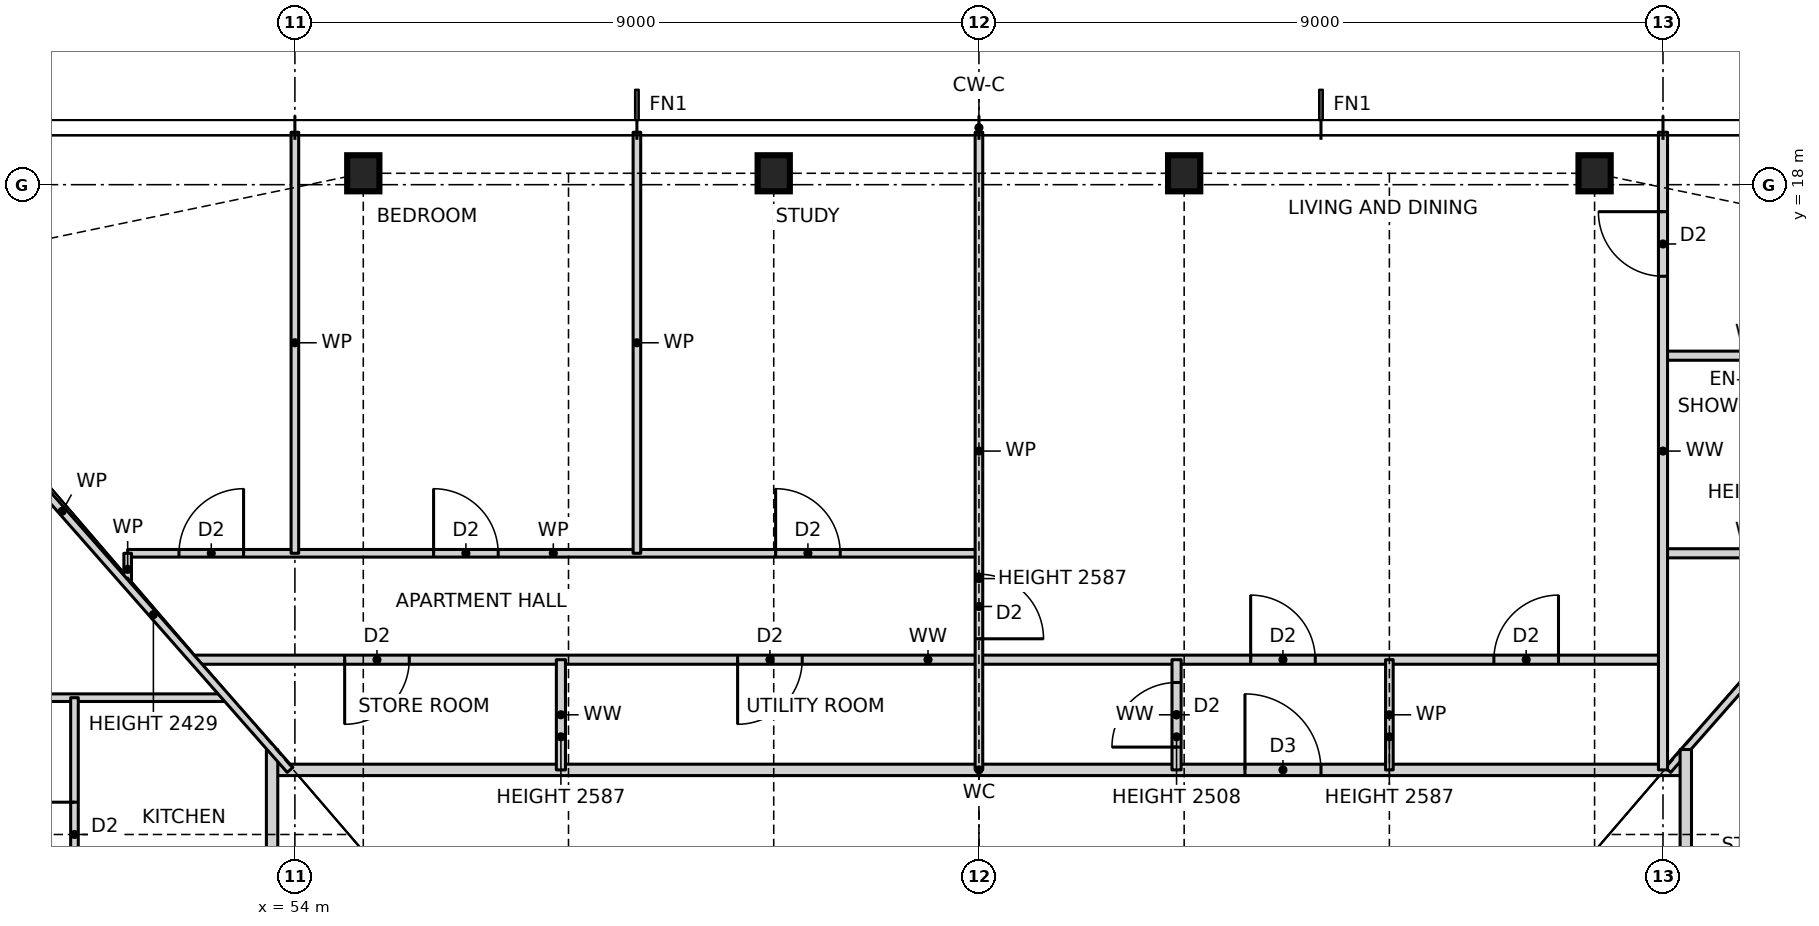
"""IFC4 building model, lengths in metres.
Left out: names, types, materials, properties, quantities, classifications, styles, units other than length and angle.
Written with IfcOpenShell. Run it as: python <this file> out.ifc"""

import sys

from ifc_helpers import new_model, si_unit, direction, frame, frame_2d, origin, origin_2d, place, context, subcontext, project, spatial, rectangle, i_section, extrude, element, fill, save


model = new_model("IFC4")
c1 = context("Model", 3, precision=1e-05, world=origin(), true_north=direction((0.0, 1.0)))
c2 = subcontext(c1, "Body", "Model", "MODEL_VIEW")
j1 = project(units=[si_unit("LENGTHUNIT", "METRE"), si_unit("PLANEANGLEUNIT", "RADIAN")], contexts=[c1])
p1 = place(None, origin())
s1 = spatial("IfcSite", under=j1, at=p1, CompositionType="ELEMENT")
p2 = place(p1, origin())
s2 = spatial("IfcBuilding", under=s1, at=p2, CompositionType="ELEMENT")
p3 = place(p2, frame((0.0, 0.0, 53.5)))
s3 = spatial("IfcBuildingStorey", under=s2, at=p3, CompositionType="ELEMENT", Elevation=53.5)
for number, where, z_axis, x_axis in (
    (1, (71.1, 18.15, 0.0), (0.0, 0.0, 1.0), (1.0, 0.0, 0.0)),
    (2, (65.7, 18.15, 0.0), (0.0, 0.0, 1.0), (1.0, 0.0, 0.0)),
    (3, (60.3, 18.15, 0.0), (0.0, 0.0, 1.0), (1.0, 0.0, 0.0)),
    (4, (54.9, 18.15, 0.0), (0.0, 0.0, 1.0), (1.0, 0.0, 0.0)),
):
    element("IfcColumn", number, at=place(p3, frame(where, z_axis=z_axis, x_axis=x_axis)), inside=s3, PredefinedType="COLUMN", context=c2, shape_type="SweptSolid", body=[
        extrude(i_section(OverallWidth=0.424, OverallDepth=0.475, WebThickness=0.048, FlangeThickness=0.077, at=origin_2d()), origin(), (0.0, 0.0, 1.0), 3.5),
    ])
p4 = place(p3, frame((53.7, 10.3, 0.0), z_axis=(0.0, 0.0, 1.0), x_axis=(1.0, 0.0, 0.0)))
e5 = element("IfcWall", 5, at=p4, inside=s3, PredefinedType="PARTITIONING", context=c2, shape_type="SweptSolid", body=[
    extrude(rectangle(XDim=18.6, YDim=0.15, at=frame_2d((9.3, 0.0))), origin(), (0.0, 0.0, 1.0), 3.27),
])
p5 = place(p4, frame((12.8, 0.0, 0.0)))
e6 = element("IfcOpeningElement", 6, at=p5, cuts=e5, PredefinedType="OPENING", context=c2, shape_type="SweptSolid", body=[
    extrude(rectangle(XDim=1.0, YDim=2.1, at=frame_2d((0.5, 1.05))), frame((0.0, 0.085, 0.0), z_axis=(0.0, -1.0, 0.0), x_axis=(1.0, 0.0, 0.0)), (0.0, 0.0, 1.0), 0.17),
])
p6 = place(p3, frame((46.56, 11.25, 0.0), z_axis=(0.0, 0.0, 1.0), x_axis=(1.0, 0.0, 0.0)))
e7 = element("IfcWall", 7, at=p6, inside=s3, PredefinedType="PARTITIONING", context=c2, shape_type="SweptSolid", body=[
    extrude(rectangle(XDim=6.54, YDim=0.1, at=frame_2d((3.27, 0.0))), origin(), (0.0, 0.0, 1.0), 3.27),
])
p7 = place(p6, frame((1.845, 0.0, 0.0)))
e8 = element("IfcOpeningElement", 8, at=p7, cuts=e7, PredefinedType="OPENING", context=c2, shape_type="SweptSolid", body=[
    extrude(rectangle(XDim=0.85, YDim=2.1, at=frame_2d((0.425, 1.05))), frame((0.0, 0.06, 0.0), z_axis=(0.0, -1.0, 0.0), x_axis=(1.0, 0.0, 0.0)), (0.0, 0.0, 1.0), 0.12),
])
p8 = place(p3, frame((52.66, 11.75, 0.0), z_axis=(0.0, 0.0, 1.0), x_axis=(1.0, 0.0, 0.0)))
e9 = element("IfcWall", 9, at=p8, inside=s3, PredefinedType="PARTITIONING", context=c2, shape_type="SweptSolid", body=[
    extrude(rectangle(XDim=19.34, YDim=0.12, at=frame_2d((9.67, 0.0))), origin(), (0.0, 0.0, 1.0), 3.27),
])
p9 = place(p8, frame((17.115, 0.0, 0.0)))
e10 = element("IfcOpeningElement", 10, at=p9, cuts=e9, PredefinedType="OPENING", context=c2, shape_type="SweptSolid", body=[
    extrude(rectangle(XDim=0.85, YDim=2.1, at=frame_2d((0.425, 1.05))), frame((0.0, 0.07, 0.0), z_axis=(0.0, -1.0, 0.0), x_axis=(1.0, 0.0, 0.0)), (0.0, 0.0, 1.0), 0.14),
])
p10 = place(p8, frame((13.915, 0.0, 0.0)))
e11 = element("IfcOpeningElement", 11, at=p10, cuts=e9, PredefinedType="OPENING", context=c2, shape_type="SweptSolid", body=[
    extrude(rectangle(XDim=0.85, YDim=2.1, at=frame_2d((0.425, 1.05))), frame((0.0, 0.07, 0.0), z_axis=(0.0, -1.0, 0.0), x_axis=(1.0, 0.0, 0.0)), (0.0, 0.0, 1.0), 0.14),
])
p11 = place(p8, frame((7.165, 0.0, 0.0)))
e12 = element("IfcOpeningElement", 12, at=p11, cuts=e9, PredefinedType="OPENING", context=c2, shape_type="SweptSolid", body=[
    extrude(rectangle(XDim=0.85, YDim=2.1, at=frame_2d((0.425, 1.05))), frame((0.0, 0.07, 0.0), z_axis=(0.0, -1.0, 0.0), x_axis=(1.0, 0.0, 0.0)), (0.0, 0.0, 1.0), 0.14),
])
p12 = place(p8, frame((1.995, 0.0, 0.0)))
e13 = element("IfcOpeningElement", 13, at=p12, cuts=e9, PredefinedType="OPENING", context=c2, shape_type="SweptSolid", body=[
    extrude(rectangle(XDim=0.85, YDim=2.1, at=frame_2d((0.425, 1.05))), frame((0.0, 0.07, 0.0), z_axis=(0.0, -1.0, 0.0), x_axis=(1.0, 0.0, 0.0)), (0.0, 0.0, 1.0), 0.14),
])
p13 = place(p3, frame((51.8, 13.15, 0.0), z_axis=(0.0, 0.0, 1.0), x_axis=(1.0, 0.0, 0.0)))
e14 = element("IfcWall", 14, at=p13, inside=s3, PredefinedType="PARTITIONING", context=c2, shape_type="SweptSolid", body=[
    extrude(rectangle(XDim=11.2, YDim=0.1, at=frame_2d((5.6, 0.0))), origin(), (0.0, 0.0, 1.0), 3.27),
])
p14 = place(p13, frame((8.525, 0.0, 0.0)))
e15 = element("IfcOpeningElement", 15, at=p14, cuts=e14, PredefinedType="OPENING", context=c2, shape_type="SweptSolid", body=[
    extrude(rectangle(XDim=0.85, YDim=2.1, at=frame_2d((0.425, 1.05))), frame((0.0, 0.06, 0.0), z_axis=(0.0, -1.0, 0.0), x_axis=(1.0, 0.0, 0.0)), (0.0, 0.0, 1.0), 0.12),
])
p15 = place(p13, frame((4.025, 0.0, 0.0)))
e16 = element("IfcOpeningElement", 16, at=p15, cuts=e14, PredefinedType="OPENING", context=c2, shape_type="SweptSolid", body=[
    extrude(rectangle(XDim=0.85, YDim=2.1, at=frame_2d((0.425, 1.05))), frame((0.0, 0.06, 0.0), z_axis=(0.0, -1.0, 0.0), x_axis=(1.0, 0.0, 0.0)), (0.0, 0.0, 1.0), 0.12),
])
p16 = place(p13, frame((0.675, 0.0, 0.0)))
e17 = element("IfcOpeningElement", 17, at=p16, cuts=e14, PredefinedType="OPENING", context=c2, shape_type="SweptSolid", body=[
    extrude(rectangle(XDim=0.85, YDim=2.1, at=frame_2d((0.425, 1.05))), frame((0.0, 0.06, 0.0), z_axis=(0.0, -1.0, 0.0), x_axis=(1.0, 0.0, 0.0)), (0.0, 0.0, 1.0), 0.12),
])
for number, where, z_axis, x_axis in (
    (18, (72.0, 13.15, 0.0), (0.0, 0.0, 1.0), (1.0, 0.0, 0.0)),
    (19, (72.0, 15.75, 0.0), (0.0, 0.0, 1.0), (1.0, 0.0, 0.0)),
):
    element("IfcWall", number, at=place(p3, frame(where, z_axis=z_axis, x_axis=x_axis)), inside=s3, PredefinedType="PARTITIONING", context=c2, shape_type="SweptSolid", body=[
        extrude(rectangle(XDim=2.4, YDim=0.12, at=frame_2d((1.2, 0.0))), origin(), (0.0, 0.0, 1.0), 3.27),
    ])
p17 = place(p3, frame((72.064, 10.3, 0.0), z_axis=(0.0, 0.0, 1.0), x_axis=(0.660700699661, 0.750649442461, 0.0)))
e20 = element("IfcWall", 20, at=p17, inside=s3, PredefinedType="PARTITIONING", context=c2, shape_type="SweptSolid", body=[
    extrude(rectangle(XDim=9.071, YDim=0.1, at=frame_2d((4.535, 0.0))), origin(), (0.0, 0.0, 1.0), 2.429),
])
p18 = place(p3, frame((72.3, -10.568, 0.0), z_axis=(0.0, 0.0, 1.0), x_axis=(0.0, 1.0, 0.0)))
e21 = element("IfcWall", 21, at=p18, inside=s3, PredefinedType="PARTITIONING", context=c2, shape_type="SweptSolid", body=[
    extrude(rectangle(XDim=21.136, YDim=0.15, at=frame_2d((10.568, 0.0))), origin(), (0.0, 0.0, 1.0), 3.27),
])
p19 = place(p18, frame((8.318, 0.0, 0.0)))
e22 = element("IfcOpeningElement", 22, at=p19, cuts=e21, PredefinedType="OPENING", context=c2, shape_type="SweptSolid", body=[
    extrude(rectangle(XDim=1.0, YDim=2.1, at=frame_2d((0.5, 1.05))), frame((0.0, 0.085, 0.0), z_axis=(0.0, -1.0, 0.0), x_axis=(1.0, 0.0, 0.0)), (0.0, 0.0, 1.0), 0.17),
])
p20 = place(p3, frame((72.0, 10.3, 0.0), z_axis=(0.0, 0.0, 1.0), x_axis=(0.0, 1.0, 0.0)))
e23 = element("IfcWall", 23, at=p20, inside=s3, PredefinedType="PARTITIONING", context=c2, shape_type="SweptSolid", body=[
    extrude(rectangle(XDim=8.39, YDim=0.12, at=frame_2d((4.195, 0.0))), origin(), (0.0, 0.0, 1.0), 3.27),
])
p21 = place(p20, frame((6.495, 0.0, 0.0)))
e24 = element("IfcOpeningElement", 24, at=p21, cuts=e23, PredefinedType="OPENING", context=c2, shape_type="SweptSolid", body=[
    extrude(rectangle(XDim=0.85, YDim=2.1, at=frame_2d((0.425, 1.05))), frame((0.0, 0.07, 0.0), z_axis=(0.0, -1.0, 0.0), x_axis=(1.0, 0.0, 0.0)), (0.0, 0.0, 1.0), 0.14),
])
p22 = place(p3, frame((68.4, 10.3, 0.0), z_axis=(0.0, 0.0, 1.0), x_axis=(0.0, 1.0, 0.0)))
e25 = element("IfcWall", 25, at=p22, inside=s3, PredefinedType="PARTITIONING", context=c2, shape_type="SweptSolid", body=[
    extrude(rectangle(XDim=1.45, YDim=0.1, at=frame_2d((0.725, 0.0))), origin(), (0.0, 0.0, 1.0), 2.587),
])
p23 = place(p3, frame((65.6, 10.3, 0.0), z_axis=(0.0, 0.0, 1.0), x_axis=(0.0, 1.0, 0.0)))
e26 = element("IfcWall", 26, at=p23, inside=s3, PredefinedType="PARTITIONING", context=c2, shape_type="SweptSolid", body=[
    extrude(rectangle(XDim=1.45, YDim=0.12, at=frame_2d((0.725, 0.0))), origin(), (0.0, 0.0, 1.0), 2.508),
])
p24 = place(p23, frame((0.3, 0.0, 0.0)))
e27 = element("IfcOpeningElement", 27, at=p24, cuts=e26, PredefinedType="OPENING", context=c2, shape_type="SweptSolid", body=[
    extrude(rectangle(XDim=0.85, YDim=2.1, at=frame_2d((0.425, 1.05))), frame((0.0, 0.07, 0.0), z_axis=(0.0, -1.0, 0.0), x_axis=(1.0, 0.0, 0.0)), (0.0, 0.0, 1.0), 0.14),
])
p25 = place(p3, frame((63.0, 10.3, 0.0), z_axis=(0.0, 0.0, 1.0), x_axis=(0.0, 1.0, 0.0)))
e28 = element("IfcWall", 28, at=p25, inside=s3, PredefinedType="PARTITIONING", context=c2, shape_type="SweptSolid", body=[
    extrude(rectangle(XDim=8.39, YDim=0.1, at=frame_2d((4.195, 0.0))), origin(), (0.0, 0.0, 1.0), 2.587),
])
p26 = place(p25, frame((1.725, 0.0, 0.0)))
e29 = element("IfcOpeningElement", 29, at=p26, cuts=e28, PredefinedType="OPENING", context=c2, shape_type="SweptSolid", body=[
    extrude(rectangle(XDim=0.85, YDim=2.1, at=frame_2d((0.425, 1.05))), frame((0.0, 0.06, 0.0), z_axis=(0.0, -1.0, 0.0), x_axis=(1.0, 0.0, 0.0)), (0.0, 0.0, 1.0), 0.12),
])
p27 = place(p3, frame((58.5, 13.15, 0.0), z_axis=(0.0, 0.0, 1.0), x_axis=(0.0, 1.0, 0.0)))
e30 = element("IfcWall", 30, at=p27, inside=s3, PredefinedType="PARTITIONING", context=c2, shape_type="SweptSolid", body=[
    extrude(rectangle(XDim=5.54, YDim=0.1, at=frame_2d((2.77, 0.0))), origin(), (0.0, 0.0, 1.0), 3.27),
])
p28 = place(p3, frame((57.5, 10.3, 0.0), z_axis=(0.0, 0.0, 1.0), x_axis=(0.0, 1.0, 0.0)))
e31 = element("IfcWall", 31, at=p28, inside=s3, PredefinedType="PARTITIONING", context=c2, shape_type="SweptSolid", body=[
    extrude(rectangle(XDim=1.45, YDim=0.12, at=frame_2d((0.725, 0.0))), origin(), (0.0, 0.0, 1.0), 2.587),
])
p29 = place(p3, frame((54.0, 13.15, 0.0), z_axis=(0.0, 0.0, 1.0), x_axis=(0.0, 1.0, 0.0)))
e32 = element("IfcWall", 32, at=p29, inside=s3, PredefinedType="PARTITIONING", context=c2, shape_type="SweptSolid", body=[
    extrude(rectangle(XDim=5.54, YDim=0.1, at=frame_2d((2.77, 0.0))), origin(), (0.0, 0.0, 1.0), 3.27),
])
p30 = place(p3, frame((53.7, -10.568, 0.0), z_axis=(0.0, 0.0, 1.0), x_axis=(0.0, 1.0, 0.0)))
e33 = element("IfcWall", 33, at=p30, inside=s3, PredefinedType="PARTITIONING", context=c2, shape_type="SweptSolid", body=[
    extrude(rectangle(XDim=21.136, YDim=0.15, at=frame_2d((10.568, 0.0))), origin(), (0.0, 0.0, 1.0), 3.27),
])
p31 = place(p30, frame((16.318, 0.0, 0.0)))
e34 = element("IfcOpeningElement", 34, at=p31, cuts=e33, PredefinedType="OPENING", context=c2, shape_type="SweptSolid", body=[
    extrude(rectangle(XDim=1.0, YDim=2.1, at=frame_2d((0.5, 1.05))), frame((0.0, 0.085, 0.0), z_axis=(0.0, -1.0, 0.0), x_axis=(1.0, 0.0, 0.0)), (0.0, 0.0, 1.0), 0.17),
])
p32 = place(p30, frame((10.918, 0.0, 0.0)))
e35 = element("IfcOpeningElement", 35, at=p32, cuts=e33, PredefinedType="OPENING", context=c2, shape_type="SweptSolid", body=[
    extrude(rectangle(XDim=1.0, YDim=2.1, at=frame_2d((0.5, 1.05))), frame((0.0, 0.085, 0.0), z_axis=(0.0, -1.0, 0.0), x_axis=(1.0, 0.0, 0.0)), (0.0, 0.0, 1.0), 0.17),
])
p33 = place(p3, frame((51.8, 12.727, 0.0), z_axis=(0.0, 0.0, 1.0), x_axis=(0.0, 1.0, 0.0)))
e36 = element("IfcWall", 36, at=p33, inside=s3, PredefinedType="PARTITIONING", context=c2, shape_type="SweptSolid", body=[
    extrude(rectangle(XDim=0.423, YDim=0.1, at=frame_2d((0.211, 0.0))), origin(), (0.0, 0.0, 1.0), 3.27),
])
p34 = place(p3, frame((51.1, 2.25, 0.0), z_axis=(0.0, 0.0, 1.0), x_axis=(0.0, 1.0, 0.0)))
e37 = element("IfcWall", 37, at=p34, inside=s3, PredefinedType="PARTITIONING", context=c2, shape_type="SweptSolid", body=[
    extrude(rectangle(XDim=9.0, YDim=0.1, at=frame_2d((4.5, 0.0))), origin(), (0.0, 0.0, 1.0), 3.27),
])
p35 = place(p34, frame((6.775, 0.0, 0.0)))
e38 = element("IfcOpeningElement", 38, at=p35, cuts=e37, PredefinedType="OPENING", context=c2, shape_type="SweptSolid", body=[
    extrude(rectangle(XDim=0.85, YDim=2.1, at=frame_2d((0.425, 1.05))), frame((0.0, 0.06, 0.0), z_axis=(0.0, -1.0, 0.0), x_axis=(1.0, 0.0, 0.0)), (0.0, 0.0, 1.0), 0.12),
])
p36 = place(p34, frame((3.575, 0.0, 0.0)))
e39 = element("IfcOpeningElement", 39, at=p36, cuts=e37, PredefinedType="OPENING", context=c2, shape_type="SweptSolid", body=[
    extrude(rectangle(XDim=0.85, YDim=2.1, at=frame_2d((0.425, 1.05))), frame((0.0, 0.06, 0.0), z_axis=(0.0, -1.0, 0.0), x_axis=(1.0, 0.0, 0.0)), (0.0, 0.0, 1.0), 0.12),
])
p37 = place(p3, frame((53.936, 10.3, 0.0), z_axis=(0.0, 0.0, 1.0), x_axis=(-0.660638210404, 0.750704439146, 0.0)))
e40 = element("IfcWall", 40, at=p37, inside=s3, PredefinedType="PARTITIONING", context=c2, shape_type="SweptSolid", body=[
    extrude(rectangle(XDim=9.07, YDim=0.1, at=frame_2d((4.535, 0.0))), origin(), (0.0, 0.0, 1.0), 2.429),
])
p38 = place(p9, origin())
e41 = element("IfcDoor", 41, at=p38, inside=s3, OperationType="SINGLE_SWING_RIGHT", PredefinedType="DOOR", context=c2, shape_type="SweptSolid", body=[
    extrude(rectangle(XDim=0.85, YDim=2.1, at=frame_2d((0.425, 1.05))), frame((0.0, 0.025, 0.0), z_axis=(0.0, -1.0, 0.0), x_axis=(1.0, 0.0, 0.0)), (0.0, 0.0, 1.0), 0.05),
])
fill(e10, e41)
p39 = place(p5, origin())
e42 = element("IfcDoor", 42, at=p39, inside=s3, OperationType="SINGLE_SWING_LEFT", PredefinedType="DOOR", context=c2, shape_type="SweptSolid", body=[
    extrude(rectangle(XDim=1.0, YDim=2.1, at=frame_2d((0.5, 1.05))), frame((0.0, 0.025, 0.0), z_axis=(0.0, -1.0, 0.0), x_axis=(1.0, 0.0, 0.0)), (0.0, 0.0, 1.0), 0.05),
])
fill(e6, e42)
p40 = place(p10, origin())
e43 = element("IfcDoor", 43, at=p40, inside=s3, OperationType="SINGLE_SWING_LEFT", PredefinedType="DOOR", context=c2, shape_type="SweptSolid", body=[
    extrude(rectangle(XDim=0.85, YDim=2.1, at=frame_2d((0.425, 1.05))), frame((0.0, 0.025, 0.0), z_axis=(0.0, -1.0, 0.0), x_axis=(1.0, 0.0, 0.0)), (0.0, 0.0, 1.0), 0.05),
])
fill(e11, e43)
p41 = place(p24, origin())
e44 = element("IfcDoor", 44, at=p41, inside=s3, OperationType="SINGLE_SWING_LEFT", PredefinedType="DOOR", context=c2, shape_type="SweptSolid", body=[
    extrude(rectangle(XDim=0.85, YDim=2.1, at=frame_2d((0.425, 1.05))), frame((0.0, 0.025, 0.0), z_axis=(0.0, -1.0, 0.0), x_axis=(1.0, 0.0, 0.0)), (0.0, 0.0, 1.0), 0.05),
])
fill(e27, e44)
p42 = place(p21, origin())
e45 = element("IfcDoor", 45, at=p42, inside=s3, OperationType="SINGLE_SWING_RIGHT", PredefinedType="DOOR", context=c2, shape_type="SweptSolid", body=[
    extrude(rectangle(XDim=0.85, YDim=2.1, at=frame_2d((0.425, 1.05))), frame((0.0, 0.025, 0.0), z_axis=(0.0, -1.0, 0.0), x_axis=(1.0, 0.0, 0.0)), (0.0, 0.0, 1.0), 0.05),
])
fill(e24, e45)
p43 = place(p26, frame((0.85, 0.0, 0.0), z_axis=(0.0, 0.0, 1.0), x_axis=(-1.0, 0.0, 0.0)))
e46 = element("IfcDoor", 46, at=p43, inside=s3, OperationType="SINGLE_SWING_RIGHT", PredefinedType="DOOR", context=c2, shape_type="SweptSolid", body=[
    extrude(rectangle(XDim=0.85, YDim=2.1, at=frame_2d((0.425, 1.05))), frame((0.0, 0.025, 0.0), z_axis=(0.0, -1.0, 0.0), x_axis=(1.0, 0.0, 0.0)), (0.0, 0.0, 1.0), 0.05),
])
fill(e29, e46)
p44 = place(p14, origin())
e47 = element("IfcDoor", 47, at=p44, inside=s3, OperationType="SINGLE_SWING_LEFT", PredefinedType="DOOR", context=c2, shape_type="SweptSolid", body=[
    extrude(rectangle(XDim=0.85, YDim=2.1, at=frame_2d((0.425, 1.05))), frame((0.0, 0.025, 0.0), z_axis=(0.0, -1.0, 0.0), x_axis=(1.0, 0.0, 0.0)), (0.0, 0.0, 1.0), 0.05),
])
fill(e15, e47)
p45 = place(p15, origin())
e48 = element("IfcDoor", 48, at=p45, inside=s3, OperationType="SINGLE_SWING_LEFT", PredefinedType="DOOR", context=c2, shape_type="SweptSolid", body=[
    extrude(rectangle(XDim=0.85, YDim=2.1, at=frame_2d((0.425, 1.05))), frame((0.0, 0.025, 0.0), z_axis=(0.0, -1.0, 0.0), x_axis=(1.0, 0.0, 0.0)), (0.0, 0.0, 1.0), 0.05),
])
fill(e16, e48)
p46 = place(p16, origin())
e49 = element("IfcDoor", 49, at=p46, inside=s3, OperationType="SINGLE_SWING_RIGHT", PredefinedType="DOOR", context=c2, shape_type="SweptSolid", body=[
    extrude(rectangle(XDim=0.85, YDim=2.1, at=frame_2d((0.425, 1.05))), frame((0.0, 0.025, 0.0), z_axis=(0.0, -1.0, 0.0), x_axis=(1.0, 0.0, 0.0)), (0.0, 0.0, 1.0), 0.05),
])
fill(e17, e49)
p47 = place(p11, frame((0.85, 0.0, 0.0), z_axis=(0.0, 0.0, 1.0), x_axis=(-1.0, 0.0, 0.0)))
e50 = element("IfcDoor", 50, at=p47, inside=s3, OperationType="SINGLE_SWING_RIGHT", PredefinedType="DOOR", context=c2, shape_type="SweptSolid", body=[
    extrude(rectangle(XDim=0.85, YDim=2.1, at=frame_2d((0.425, 1.05))), frame((0.0, 0.025, 0.0), z_axis=(0.0, -1.0, 0.0), x_axis=(1.0, 0.0, 0.0)), (0.0, 0.0, 1.0), 0.05),
])
fill(e12, e50)
p48 = place(p12, frame((0.85, 0.0, 0.0), z_axis=(0.0, 0.0, 1.0), x_axis=(-1.0, 0.0, 0.0)))
e51 = element("IfcDoor", 51, at=p48, inside=s3, OperationType="SINGLE_SWING_RIGHT", PredefinedType="DOOR", context=c2, shape_type="SweptSolid", body=[
    extrude(rectangle(XDim=0.85, YDim=2.1, at=frame_2d((0.425, 1.05))), frame((0.0, 0.025, 0.0), z_axis=(0.0, -1.0, 0.0), x_axis=(1.0, 0.0, 0.0)), (0.0, 0.0, 1.0), 0.05),
])
fill(e13, e51)
p49 = place(p35, origin())
e52 = element("IfcDoor", 52, at=p49, inside=s3, OperationType="SINGLE_SWING_RIGHT", PredefinedType="DOOR", context=c2, shape_type="SweptSolid", body=[
    extrude(rectangle(XDim=0.85, YDim=2.1, at=frame_2d((0.425, 1.05))), frame((0.0, 0.025, 0.0), z_axis=(0.0, -1.0, 0.0), x_axis=(1.0, 0.0, 0.0)), (0.0, 0.0, 1.0), 0.05),
])
fill(e38, e52)
save(model, sys.argv[1])
